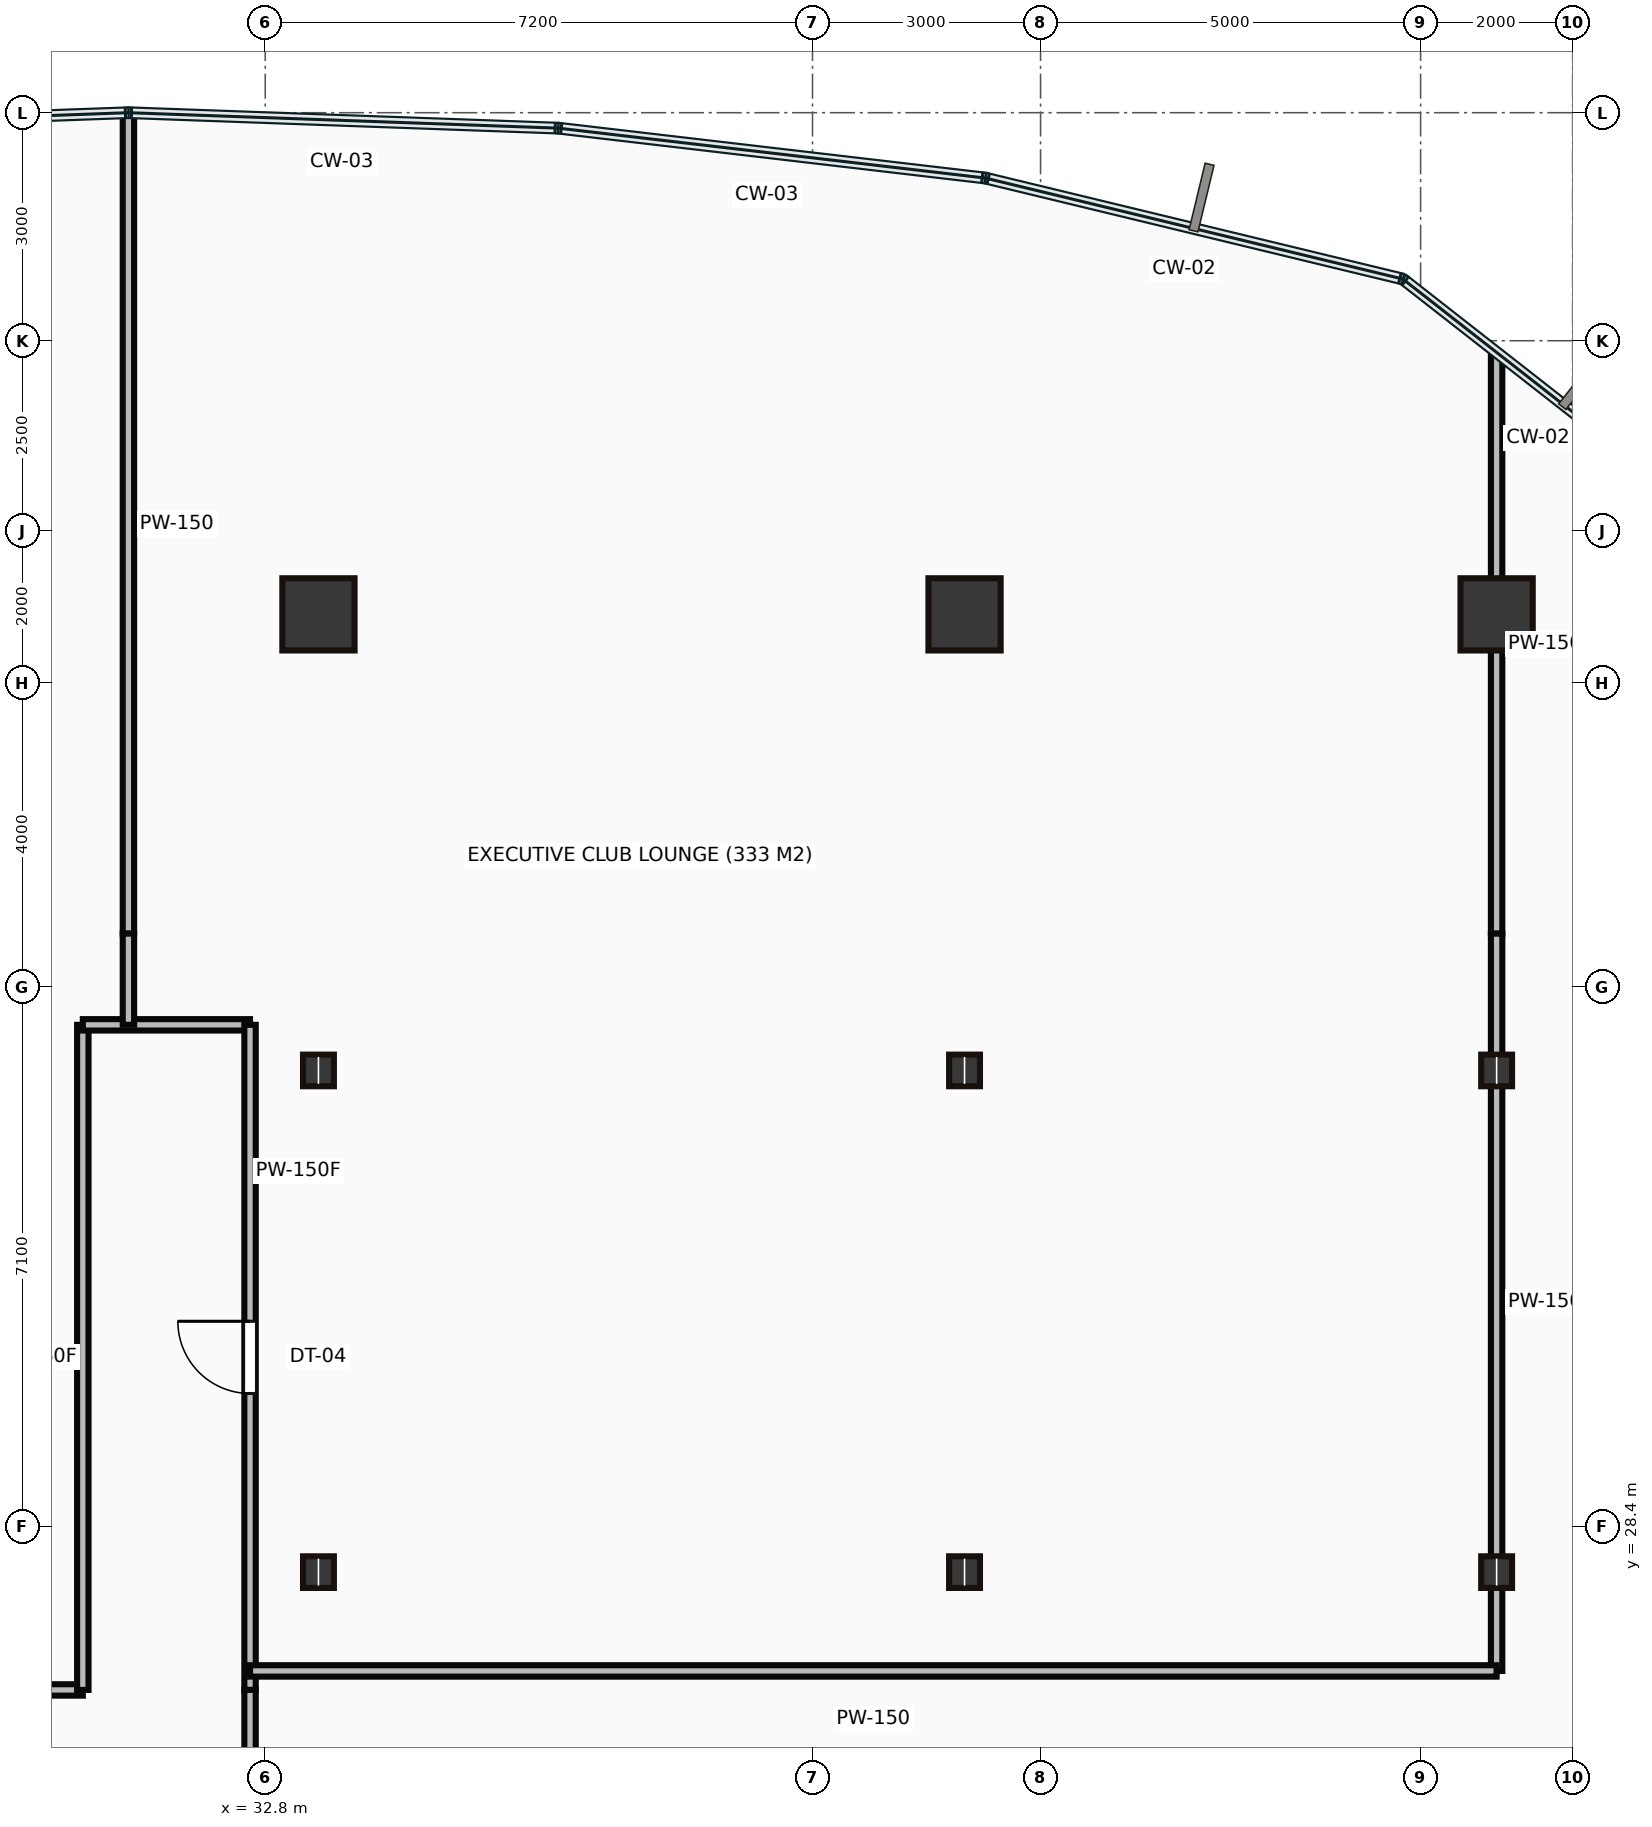
"""IFC4 building model, lengths in metres.
Left out: names, types, materials, properties, quantities, classifications, styles, units other than length and angle.
Written with IfcOpenShell. Run it as: python <this file> out.ifc"""

import sys

from ifc_helpers import new_model, si_unit, direction, frame, frame_2d, origin, origin_2d, place, context, subcontext, project, spatial, rectangle, hollow_rectangle, i_section, extrude, source, transform, mapped, element, fill, save


model = new_model("IFC4")
c1 = context("Model", 3, precision=1e-05, world=origin(), true_north=direction((0.0, 1.0)))
c2 = subcontext(c1, "Body", "Model", "MODEL_VIEW")
j1 = project(units=[si_unit("LENGTHUNIT", "METRE"), si_unit("PLANEANGLEUNIT", "RADIAN")], contexts=[c1])
p1 = place(None, origin())
s1 = spatial("IfcSite", under=j1, at=p1, CompositionType="ELEMENT")
p2 = place(p1, origin())
s2 = spatial("IfcBuilding", under=s1, at=p2, CompositionType="ELEMENT")
p3 = place(p2, frame((0.0, 0.0, 61.7)))
s3 = spatial("IfcBuildingStorey", under=s2, at=p3, CompositionType="ELEMENT", Elevation=61.7)
m1 = source(origin(), c2, "Body", "SweptSolid", [
    extrude(i_section(OverallWidth=0.406, OverallDepth=0.416, WebThickness=0.03, FlangeThickness=0.048, at=origin_2d()), origin(), (0.0, 0.0, 1.0), 3.65),
])
for number, where, z_axis, x_axis in (
    (1, (33.5, 27.8, 0.0), (0.0, 0.0, 1.0), (1.0, 0.0, 0.0)),
    (2, (33.5, 34.4, 0.0), (0.0, 0.0, 1.0), (1.0, 0.0, 0.0)),
):
    element("IfcColumn", number, at=place(p3, frame(where, z_axis=z_axis, x_axis=x_axis)), inside=s3, PredefinedType="COLUMN", context=c2, shape_type="MappedRepresentation", body=[
        mapped(m1, transform((0.0, 0.0, 0.0))),
    ])
m2 = source(origin(), c2, "Body", "SweptSolid", [
    extrude(hollow_rectangle(XDim=0.95, YDim=0.95, WallThickness=0.045, at=origin_2d()), origin(), (0.0, 0.0, 1.0), 3.65),
])
p4 = place(p3, frame((33.5, 40.4, 0.0), z_axis=(0.0, 0.0, 1.0), x_axis=(1.0, 0.0, 0.0)))
e3 = element("IfcColumn", 3, at=p4, inside=s3, PredefinedType="COLUMN", context=c2, shape_type="MappedRepresentation", body=[
    mapped(m2, transform((0.0, 0.0, 0.0))),
])
for number, where, z_axis, x_axis in (
    (4, (42.0, 27.8, 0.0), (0.0, 0.0, 1.0), (1.0, 0.0, 0.0)),
    (5, (42.0, 34.4, 0.0), (0.0, 0.0, 1.0), (1.0, 0.0, 0.0)),
):
    element("IfcColumn", number, at=place(p3, frame(where, z_axis=z_axis, x_axis=x_axis)), inside=s3, PredefinedType="COLUMN", context=c2, shape_type="MappedRepresentation", body=[
        mapped(m1, transform((0.0, 0.0, 0.0))),
    ])
p5 = place(p3, frame((42.0, 40.4, 0.0), z_axis=(0.0, 0.0, 1.0), x_axis=(1.0, 0.0, 0.0)))
e6 = element("IfcColumn", 6, at=p5, inside=s3, PredefinedType="COLUMN", context=c2, shape_type="MappedRepresentation", body=[
    mapped(m2, transform((0.0, 0.0, 0.0))),
])
for number, where, z_axis, x_axis in (
    (7, (49.0, 27.8, 0.0), (0.0, 0.0, 1.0), (1.0, 0.0, 0.0)),
    (8, (49.0, 34.4, 0.0), (0.0, 0.0, 1.0), (1.0, 0.0, 0.0)),
):
    element("IfcColumn", number, at=place(p3, frame(where, z_axis=z_axis, x_axis=x_axis)), inside=s3, PredefinedType="COLUMN", context=c2, shape_type="MappedRepresentation", body=[
        mapped(m1, transform((0.0, 0.0, 0.0))),
    ])
p6 = place(p3, frame((49.0, 40.4, 0.0), z_axis=(0.0, 0.0, 1.0), x_axis=(1.0, 0.0, 0.0)))
e9 = element("IfcColumn", 9, at=p6, inside=s3, PredefinedType="COLUMN", context=c2, shape_type="MappedRepresentation", body=[
    mapped(m2, transform((0.0, 0.0, 0.0))),
])
m3 = source(origin(), c2, "Body", "SweptSolid", [
    extrude(rectangle(XDim=18.4, YDim=0.15, at=frame_2d((9.2, 0.0))), origin(), (0.0, 0.0, 1.0), 3.4),
])
p7 = place(p3, frame((12.0, 26.25, 0.0), z_axis=(0.0, 0.0, 1.0), x_axis=(1.0, 0.0, 0.0)))
e10 = element("IfcWall", 10, at=p7, inside=s3, PredefinedType="PARTITIONING", context=c2, shape_type="MappedRepresentation", body=[
    mapped(m3, transform((0.0, 0.0, 0.0))),
])
p8 = place(p7, frame((10.595, 0.0, 0.0)))
e11 = element("IfcOpeningElement", 11, at=p8, cuts=e10, PredefinedType="OPENING", context=c2, shape_type="SweptSolid", body=[
    extrude(rectangle(XDim=0.95, YDim=2.15, at=frame_2d((0.475, 1.075))), frame((0.0, 0.085, 0.0), z_axis=(0.0, -1.0, 0.0), x_axis=(1.0, 0.0, 0.0)), (0.0, 0.0, 1.0), 0.17),
])
m4 = source(origin(), c2, "Body", "SweptSolid", [
    extrude(rectangle(XDim=8.75, YDim=0.15, at=frame_2d((4.375, 0.0))), origin(), (0.0, 0.0, 1.0), 3.4),
])
p9 = place(p3, frame((30.4, 26.25, 0.0), z_axis=(0.0, 0.0, 1.0), x_axis=(0.0, 1.0, 0.0)))
e12 = element("IfcWall", 12, at=p9, inside=s3, PredefinedType="PARTITIONING", context=c2, shape_type="MappedRepresentation", body=[
    mapped(m4, transform((0.0, 0.0, 0.0))),
])
m5 = source(origin(), c2, "Body", "SweptSolid", [
    extrude(rectangle(XDim=2.2, YDim=0.15, at=frame_2d((1.1, 0.0))), origin(), (0.0, 0.0, 1.0), 3.4),
])
p10 = place(p3, frame((30.4, 35.0, 0.0), z_axis=(0.0, 0.0, 1.0), x_axis=(1.0, 0.0, 0.0)))
e13 = element("IfcWall", 13, at=p10, inside=s3, PredefinedType="PARTITIONING", context=c2, shape_type="MappedRepresentation", body=[
    mapped(m5, transform((0.0, 0.0, 0.0))),
])
p11 = place(p3, frame((32.6, 35.0, 0.0), z_axis=(0.0, 0.0, 1.0), x_axis=(0.0, -1.0, 0.0)))
e14 = element("IfcWall", 14, at=p11, inside=s3, PredefinedType="PARTITIONING", context=c2, shape_type="MappedRepresentation", body=[
    mapped(m4, transform((0.0, 0.0, 0.0))),
])
p12 = place(p11, frame((3.9, 0.0, 0.0)))
e15 = element("IfcOpeningElement", 15, at=p12, cuts=e14, PredefinedType="OPENING", context=c2, shape_type="SweptSolid", body=[
    extrude(rectangle(XDim=0.95, YDim=2.15, at=frame_2d((0.475, 1.075))), frame((0.0, 0.085, 0.0), z_axis=(0.0, -1.0, 0.0), x_axis=(1.0, 0.0, 0.0)), (0.0, 0.0, 1.0), 0.17),
])
m6 = source(origin(), c2, "Body", "SweptSolid", [
    extrude(rectangle(XDim=2.05, YDim=0.15, at=frame_2d((1.025, 0.0))), origin(), (0.0, 0.0, 1.0), 3.4),
])
p13 = place(p3, frame((32.6, 26.25, 0.0), z_axis=(0.0, 0.0, 1.0), x_axis=(0.0, -1.0, 0.0)))
e16 = element("IfcWall", 16, at=p13, inside=s3, PredefinedType="PARTITIONING", context=c2, shape_type="MappedRepresentation", body=[
    mapped(m6, transform((0.0, 0.0, 0.0))),
])
m7 = source(origin(), c2, "Body", "SweptSolid", [
    extrude(rectangle(XDim=10.78, YDim=0.15, at=frame_2d((5.39, 0.0))), origin(), (0.0, 0.0, 1.0), 3.4),
])
p14 = place(p3, frame((31.0, 46.98, 0.0), z_axis=(0.0, 0.0, 1.0), x_axis=(0.0, -1.0, 0.0)))
e17 = element("IfcWall", 17, at=p14, inside=s3, PredefinedType="PARTITIONING", context=c2, shape_type="MappedRepresentation", body=[
    mapped(m7, transform((0.0, 0.0, 0.0))),
])
m8 = source(origin(), c2, "Body", "SweptSolid", [
    extrude(rectangle(XDim=1.2, YDim=0.15, at=frame_2d((0.6, 0.0))), origin(), (0.0, 0.0, 1.0), 3.4),
])
p15 = place(p3, frame((31.0, 36.2, 0.0), z_axis=(0.0, 0.0, 1.0), x_axis=(0.0, -1.0, 0.0)))
e18 = element("IfcWall", 18, at=p15, inside=s3, PredefinedType="PARTITIONING", context=c2, shape_type="MappedRepresentation", body=[
    mapped(m8, transform((0.0, 0.0, 0.0))),
])
m9 = source(origin(), c2, "Body", "SweptSolid", [
    extrude(rectangle(XDim=7.621, YDim=0.15, at=frame_2d((3.811, 0.0))), origin(), (0.0, 0.0, 1.0), 2.625),
])
p16 = place(p3, frame((49.0, 43.821, 0.0), z_axis=(0.0, 0.0, 1.0), x_axis=(0.0, -1.0, 0.0)))
e19 = element("IfcWall", 19, at=p16, inside=s3, PredefinedType="PARTITIONING", context=c2, shape_type="MappedRepresentation", body=[
    mapped(m9, transform((0.0, 0.0, 0.0))),
])
m10 = source(origin(), c2, "Body", "SweptSolid", [
    extrude(rectangle(XDim=9.7, YDim=0.15, at=frame_2d((4.85, 0.0))), origin(), (0.0, 0.0, 1.0), 2.625),
])
p17 = place(p3, frame((49.0, 36.2, 0.0), z_axis=(0.0, 0.0, 1.0), x_axis=(0.0, -1.0, 0.0)))
e20 = element("IfcWall", 20, at=p17, inside=s3, PredefinedType="PARTITIONING", context=c2, shape_type="MappedRepresentation", body=[
    mapped(m10, transform((0.0, 0.0, 0.0))),
])
m11 = source(origin(), c2, "Body", "SweptSolid", [
    extrude(rectangle(XDim=16.4, YDim=0.15, at=frame_2d((8.2, 0.0))), origin(), (0.0, 0.0, 1.0), 3.4),
])
p18 = place(p3, frame((49.0, 26.5, 0.0), z_axis=(0.0, 0.0, 1.0), x_axis=(-1.0, 0.0, 0.0)))
e21 = element("IfcWall", 21, at=p18, inside=s3, PredefinedType="PARTITIONING", context=c2, shape_type="MappedRepresentation", body=[
    mapped(m11, transform((0.0, 0.0, 0.0))),
])
m12 = source(origin(), c2, "Body", "SweptSolid", [
    extrude(rectangle(XDim=0.95, YDim=2.15, at=frame_2d((0.475, 1.075))), frame((0.0, 0.025, 0.0), z_axis=(0.0, -1.0, 0.0), x_axis=(1.0, 0.0, 0.0)), (0.0, 0.0, 1.0), 0.05),
])
p19 = place(p12, origin())
e22 = element("IfcDoor", 22, at=p19, inside=s3, OperationType="SINGLE_SWING_LEFT", PredefinedType="DOOR", context=c2, shape_type="MappedRepresentation", body=[
    mapped(m12, transform((0.0, 0.0, 0.0))),
])
fill(e15, e22)
save(model, sys.argv[1])
